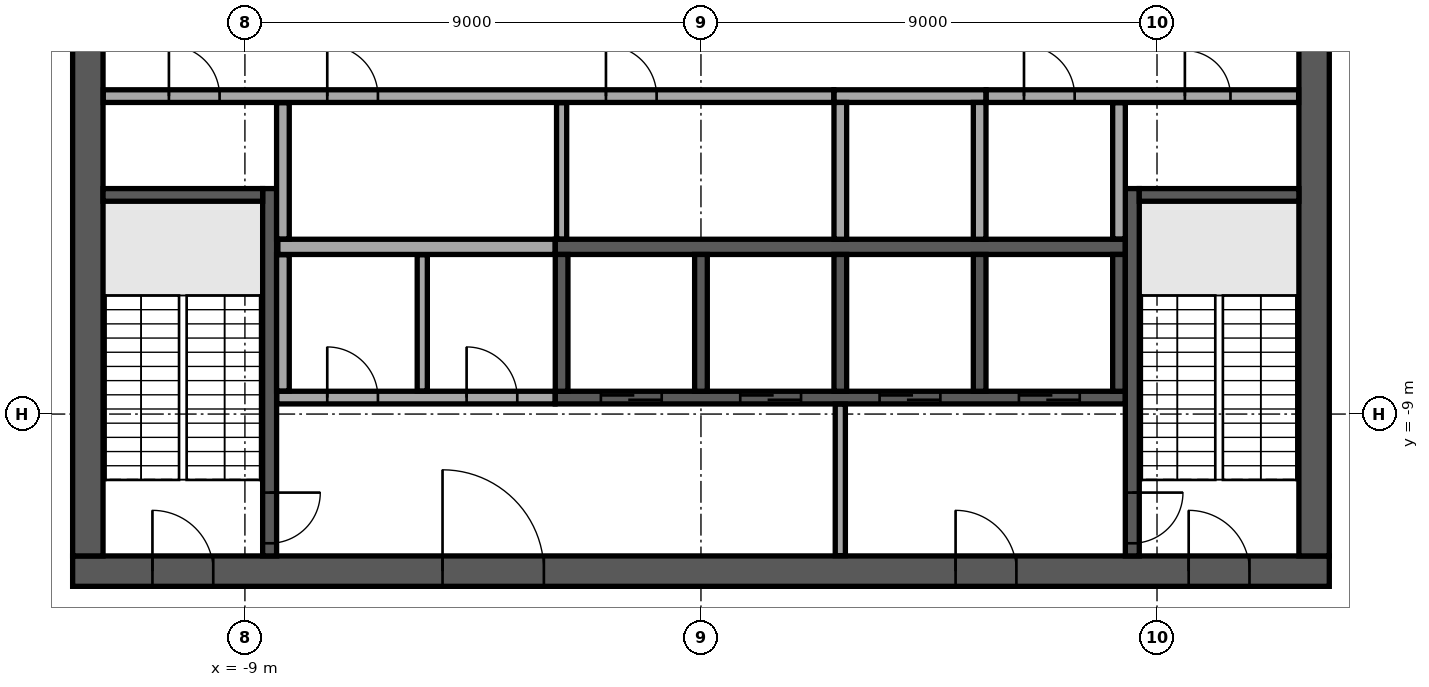
"""IFC4 building model, lengths in metres.
Left out: names, types, materials, properties, quantities, classifications, styles, units other than length and angle.
Written with IfcOpenShell. Run it as: python <this file> out.ifc"""

import sys

from ifc_helpers import new_model, si_unit, direction, frame, frame_2d, origin, place, context, subcontext, project, spatial, rectangle, extrude, element, fill, save


model = new_model("IFC4")
c1 = context("Model", 3, precision=1e-05, world=origin(), true_north=direction((0.0, 1.0)))
c2 = subcontext(c1, "Body", "Model", "MODEL_VIEW")
j1 = project(units=[si_unit("LENGTHUNIT", "METRE"), si_unit("PLANEANGLEUNIT", "RADIAN")], contexts=[c1])
p1 = place(None, origin())
s1 = spatial("IfcSite", under=j1, at=p1, CompositionType="ELEMENT")
p2 = place(p1, origin())
s2 = spatial("IfcBuilding", under=s1, at=p2, CompositionType="ELEMENT")
p3 = place(p2, frame((0.0, 0.0, 358.1)))
s3 = spatial("IfcBuildingStorey", under=s2, at=p3, CompositionType="ELEMENT", Elevation=358.1)
p4 = place(p3, frame((-12.4, -12.1, 0.0), z_axis=(0.0, 0.0, 1.0), x_axis=(1.0, 0.0, 0.0)))
e1 = element("IfcWall", 1, at=p4, inside=s3, PredefinedType="SHEAR", context=c2, shape_type="SweptSolid", body=[
    extrude(rectangle(XDim=24.8, YDim=0.6, at=frame_2d((12.4, 0.0))), origin(), (0.0, 0.0, 1.0), 4.7),
])
p5 = place(p4, frame((7.3, 0.0, 0.0)))
e2 = element("IfcOpeningElement", 2, at=p5, cuts=e1, PredefinedType="OPENING", context=c2, shape_type="SweptSolid", body=[
    extrude(rectangle(XDim=2.0, YDim=2.1, at=frame_2d((1.0, 1.05))), frame((0.0, 0.31, 0.0), z_axis=(0.0, -1.0, 0.0), x_axis=(1.0, 0.0, 0.0)), (0.0, 0.0, 1.0), 0.62),
])
p6 = place(p4, frame((17.425, 0.0, 0.0)))
e3 = element("IfcOpeningElement", 3, at=p6, cuts=e1, PredefinedType="OPENING", context=c2, shape_type="SweptSolid", body=[
    extrude(rectangle(XDim=1.2, YDim=2.1, at=frame_2d((0.6, 1.05))), frame((0.0, 0.31, 0.0), z_axis=(0.0, -1.0, 0.0), x_axis=(1.0, 0.0, 0.0)), (0.0, 0.0, 1.0), 0.62),
])
p7 = place(p4, frame((1.575, 0.0, 0.0)))
e4 = element("IfcOpeningElement", 4, at=p7, cuts=e1, PredefinedType="OPENING", context=c2, shape_type="SweptSolid", body=[
    extrude(rectangle(XDim=1.2, YDim=2.1, at=frame_2d((0.6, 1.05))), frame((0.0, 0.31, 0.0), z_axis=(0.0, -1.0, 0.0), x_axis=(1.0, 0.0, 0.0)), (0.0, 0.0, 1.0), 0.62),
])
p8 = place(p4, frame((22.025, 0.0, 0.0)))
e5 = element("IfcOpeningElement", 5, at=p8, cuts=e1, PredefinedType="OPENING", context=c2, shape_type="SweptSolid", body=[
    extrude(rectangle(XDim=1.2, YDim=2.1, at=frame_2d((0.6, 1.05))), frame((0.0, 0.31, 0.0), z_axis=(0.0, -1.0, 0.0), x_axis=(1.0, 0.0, 0.0)), (0.0, 0.0, 1.0), 0.62),
])
p9 = place(p3, frame((12.1, -11.8, 0.0), z_axis=(0.0, 0.0, 1.0), x_axis=(0.0, 1.0, 0.0)))
e6 = element("IfcWall", 6, at=p9, inside=s3, PredefinedType="SHEAR", context=c2, shape_type="SweptSolid", body=[
    extrude(rectangle(XDim=23.6, YDim=0.6, at=frame_2d((11.8, 0.0))), origin(), (0.0, 0.0, 1.0), 4.7),
])
p10 = place(p9, frame((10.6, 0.0, 0.0)))
e7 = element("IfcOpeningElement", 7, at=p10, cuts=e6, PredefinedType="OPENING", context=c2, shape_type="SweptSolid", body=[
    extrude(rectangle(XDim=2.4, YDim=2.4, at=frame_2d((1.2, 1.2))), frame((0.0, 0.31, 0.0), z_axis=(0.0, -1.0, 0.0), x_axis=(1.0, 0.0, 0.0)), (0.0, 0.0, 1.0), 0.62),
])
p11 = place(p3, frame((-12.1, -11.8, 0.0), z_axis=(0.0, 0.0, 1.0), x_axis=(0.0, 1.0, 0.0)))
e8 = element("IfcWall", 8, at=p11, inside=s3, PredefinedType="SHEAR", context=c2, shape_type="SweptSolid", body=[
    extrude(rectangle(XDim=23.6, YDim=0.6, at=frame_2d((11.8, 0.0))), origin(), (0.0, 0.0, 1.0), 4.7),
])
p12 = place(p11, frame((10.6, 0.0, 0.0)))
e9 = element("IfcOpeningElement", 9, at=p12, cuts=e8, PredefinedType="OPENING", context=c2, shape_type="SweptSolid", body=[
    extrude(rectangle(XDim=2.4, YDim=2.4, at=frame_2d((1.2, 1.2))), frame((0.0, 0.31, 0.0), z_axis=(0.0, -1.0, 0.0), x_axis=(1.0, 0.0, 0.0)), (0.0, 0.0, 1.0), 0.62),
])
p13 = place(p3, frame((-2.875, -5.7, 0.0), z_axis=(0.0, 0.0, 1.0), x_axis=(1.0, 0.0, 0.0)))
e10 = element("IfcWall", 10, at=p13, inside=s3, PredefinedType="SOLIDWALL", context=c2, shape_type="SweptSolid", body=[
    extrude(rectangle(XDim=11.25, YDim=0.3, at=frame_2d((5.625, 0.0))), origin(), (0.0, 0.0, 1.0), 4.7),
])
p14 = place(p3, frame((2.625, -2.725, 0.0), z_axis=(0.0, 0.0, 1.0), x_axis=(1.0, 0.0, 0.0)))
e11 = element("IfcWall", 11, at=p14, inside=s3, PredefinedType="SOLIDWALL", context=c2, shape_type="SweptSolid", body=[
    extrude(rectangle(XDim=3.0, YDim=0.25, at=frame_2d((1.5, 0.0))), origin(), (0.0, 0.0, 1.0), 4.7),
])
for number, where, z_axis, x_axis in (
    (12, (2.75, -5.55, 0.0), (0.0, 0.0, 1.0), (0.0, 1.0, 0.0)),
    (13, (5.5, -5.55, 0.0), (0.0, 0.0, 1.0), (0.0, 1.0, 0.0)),
):
    element("IfcWall", number, at=place(p3, frame(where, z_axis=z_axis, x_axis=x_axis)), inside=s3, PredefinedType="SOLIDWALL", context=c2, shape_type="SweptSolid", body=[
        extrude(rectangle(XDim=2.7, YDim=0.25, at=frame_2d((1.35, 0.0))), origin(), (0.0, 0.0, 1.0), 4.7),
    ])
p15 = place(p3, frame((-2.875, -8.675, 0.0), z_axis=(0.0, 0.0, 1.0), x_axis=(1.0, 0.0, 0.0)))
e14 = element("IfcWall", 14, at=p15, inside=s3, PredefinedType="SOLIDWALL", context=c2, shape_type="SweptSolid", body=[
    extrude(rectangle(XDim=11.25, YDim=0.25, at=frame_2d((5.625, 0.0))), origin(), (0.0, 0.0, 1.0), 4.7),
])
p16 = place(p15, frame((0.9, 0.0, 0.0)))
e15 = element("IfcOpeningElement", 15, at=p16, cuts=e14, PredefinedType="OPENING", context=c2, shape_type="SweptSolid", body=[
    extrude(rectangle(XDim=1.2, YDim=2.1, at=frame_2d((0.6, 1.05))), frame((0.0, 0.135, 0.0), z_axis=(0.0, -1.0, 0.0), x_axis=(1.0, 0.0, 0.0)), (0.0, 0.0, 1.0), 0.27),
])
p17 = place(p15, frame((3.65, 0.0, 0.0)))
e16 = element("IfcOpeningElement", 16, at=p17, cuts=e14, PredefinedType="OPENING", context=c2, shape_type="SweptSolid", body=[
    extrude(rectangle(XDim=1.2, YDim=2.1, at=frame_2d((0.6, 1.05))), frame((0.0, 0.135, 0.0), z_axis=(0.0, -1.0, 0.0), x_axis=(1.0, 0.0, 0.0)), (0.0, 0.0, 1.0), 0.27),
])
p18 = place(p15, frame((6.4, 0.0, 0.0)))
e17 = element("IfcOpeningElement", 17, at=p18, cuts=e14, PredefinedType="OPENING", context=c2, shape_type="SweptSolid", body=[
    extrude(rectangle(XDim=1.2, YDim=2.1, at=frame_2d((0.6, 1.05))), frame((0.0, 0.135, 0.0), z_axis=(0.0, -1.0, 0.0), x_axis=(1.0, 0.0, 0.0)), (0.0, 0.0, 1.0), 0.27),
])
p19 = place(p15, frame((9.15, 0.0, 0.0)))
e18 = element("IfcOpeningElement", 18, at=p19, cuts=e14, PredefinedType="OPENING", context=c2, shape_type="SweptSolid", body=[
    extrude(rectangle(XDim=1.2, YDim=2.1, at=frame_2d((0.6, 1.05))), frame((0.0, 0.135, 0.0), z_axis=(0.0, -1.0, 0.0), x_axis=(1.0, 0.0, 0.0)), (0.0, 0.0, 1.0), 0.27),
])
for number, where, z_axis, x_axis in (
    (19, (-2.75, -8.55, 0.0), (0.0, 0.0, 1.0), (0.0, 1.0, 0.0)),
    (20, (0.0, -8.55, 0.0), (0.0, 0.0, 1.0), (0.0, 1.0, 0.0)),
    (21, (2.75, -8.55, 0.0), (0.0, 0.0, 1.0), (0.0, 1.0, 0.0)),
    (22, (5.5, -8.55, 0.0), (0.0, 0.0, 1.0), (0.0, 1.0, 0.0)),
    (23, (8.25, -8.55, 0.0), (0.0, 0.0, 1.0), (0.0, 1.0, 0.0)),
):
    element("IfcWall", number, at=place(p3, frame(where, z_axis=z_axis, x_axis=x_axis)), inside=s3, PredefinedType="SOLIDWALL", context=c2, shape_type="SweptSolid", body=[
        extrude(rectangle(XDim=2.7, YDim=0.25, at=frame_2d((1.35, 0.0))), origin(), (0.0, 0.0, 1.0), 4.7),
    ])
p20 = place(p3, frame((-8.512, -4.55, 0.0), z_axis=(0.0, 0.0, 1.0), x_axis=(0.0, -1.0, 0.0)))
e24 = element("IfcWall", 24, at=p20, inside=s3, PredefinedType="SOLIDWALL", context=c2, shape_type="SweptSolid", body=[
    extrude(rectangle(XDim=7.25, YDim=0.275, at=frame_2d((3.625, 0.0))), origin(), (0.0, 0.0, 1.0), 4.7),
])
p21 = place(p20, frame((6.0, 0.0, 0.0)))
e25 = element("IfcOpeningElement", 25, at=p21, cuts=e24, PredefinedType="OPENING", context=c2, shape_type="SweptSolid", body=[
    extrude(rectangle(XDim=1.0, YDim=2.1, at=frame_2d((0.5, 1.05))), frame((0.0, 0.147, 0.0), z_axis=(0.0, -1.0, 0.0), x_axis=(1.0, 0.0, 0.0)), (0.0, 0.0, 1.0), 0.295),
])
p22 = place(p3, frame((-8.65, -4.675, 0.0), z_axis=(0.0, 0.0, 1.0), x_axis=(-1.0, 0.0, 0.0)))
e26 = element("IfcWall", 26, at=p22, inside=s3, PredefinedType="SOLIDWALL", context=c2, shape_type="SweptSolid", body=[
    extrude(rectangle(XDim=3.15, YDim=0.25, at=frame_2d((1.575, 0.0))), origin(), (0.0, 0.0, 1.0), 4.7),
])
p23 = place(p3, frame((8.512, -4.55, 0.0), z_axis=(0.0, 0.0, 1.0), x_axis=(0.0, -1.0, 0.0)))
e27 = element("IfcWall", 27, at=p23, inside=s3, PredefinedType="SOLIDWALL", context=c2, shape_type="SweptSolid", body=[
    extrude(rectangle(XDim=7.25, YDim=0.275, at=frame_2d((3.625, 0.0))), origin(), (0.0, 0.0, 1.0), 4.7),
])
p24 = place(p23, frame((6.0, 0.0, 0.0)))
e28 = element("IfcOpeningElement", 28, at=p24, cuts=e27, PredefinedType="OPENING", context=c2, shape_type="SweptSolid", body=[
    extrude(rectangle(XDim=1.0, YDim=2.1, at=frame_2d((0.5, 1.05))), frame((0.0, 0.147, 0.0), z_axis=(0.0, -1.0, 0.0), x_axis=(1.0, 0.0, 0.0)), (0.0, 0.0, 1.0), 0.295),
])
p25 = place(p3, frame((8.65, -4.675, 0.0), z_axis=(0.0, 0.0, 1.0), x_axis=(1.0, 0.0, 0.0)))
e29 = element("IfcWall", 29, at=p25, inside=s3, PredefinedType="SOLIDWALL", context=c2, shape_type="SweptSolid", body=[
    extrude(rectangle(XDim=3.15, YDim=0.25, at=frame_2d((1.575, 0.0))), origin(), (0.0, 0.0, 1.0), 4.7),
])
p26 = place(p3, frame((2.75, -11.795, 0.0), z_axis=(0.0, 0.0, 1.0), x_axis=(0.0, 1.0, 0.0)))
e30 = element("IfcWall", 30, at=p26, inside=s3, PredefinedType="PARTITIONING", context=c2, shape_type="SweptSolid", body=[
    extrude(rectangle(XDim=2.99, YDim=0.2, at=frame_2d((1.495, 0.0))), origin(), (0.0, 0.0, 1.0), 4.7),
])
p27 = place(p3, frame((-8.37, -8.675, 0.0), z_axis=(0.0, 0.0, 1.0), x_axis=(1.0, 0.0, 0.0)))
e31 = element("IfcWall", 31, at=p27, inside=s3, PredefinedType="PARTITIONING", context=c2, shape_type="SweptSolid", body=[
    extrude(rectangle(XDim=5.49, YDim=0.25, at=frame_2d((2.745, 0.0))), origin(), (0.0, 0.0, 1.0), 4.7),
])
p28 = place(p27, frame((0.995, 0.0, 0.0)))
e32 = element("IfcOpeningElement", 32, at=p28, cuts=e31, PredefinedType="OPENING", context=c2, shape_type="SweptSolid", body=[
    extrude(rectangle(XDim=1.0, YDim=2.1, at=frame_2d((0.5, 1.05))), frame((0.0, 0.135, 0.0), z_axis=(0.0, -1.0, 0.0), x_axis=(1.0, 0.0, 0.0)), (0.0, 0.0, 1.0), 0.27),
])
p29 = place(p27, frame((3.745, 0.0, 0.0)))
e33 = element("IfcOpeningElement", 33, at=p29, cuts=e31, PredefinedType="OPENING", context=c2, shape_type="SweptSolid", body=[
    extrude(rectangle(XDim=1.0, YDim=2.1, at=frame_2d((0.5, 1.05))), frame((0.0, 0.135, 0.0), z_axis=(0.0, -1.0, 0.0), x_axis=(1.0, 0.0, 0.0)), (0.0, 0.0, 1.0), 0.27),
])
p30 = place(p3, frame((-8.25, -8.545, 0.0), z_axis=(0.0, 0.0, 1.0), x_axis=(0.0, 1.0, 0.0)))
e34 = element("IfcWall", 34, at=p30, inside=s3, PredefinedType="PARTITIONING", context=c2, shape_type="SweptSolid", body=[
    extrude(rectangle(XDim=2.69, YDim=0.25, at=frame_2d((1.345, 0.0))), origin(), (0.0, 0.0, 1.0), 4.7),
])
p31 = place(p3, frame((-5.5, -8.545, 0.0), z_axis=(0.0, 0.0, 1.0), x_axis=(0.0, 1.0, 0.0)))
e35 = element("IfcWall", 35, at=p31, inside=s3, PredefinedType="PARTITIONING", context=c2, shape_type="SweptSolid", body=[
    extrude(rectangle(XDim=2.69, YDim=0.2, at=frame_2d((1.345, 0.0))), origin(), (0.0, 0.0, 1.0), 4.7),
])
p32 = place(p3, frame((-8.35, -5.7, 0.0), z_axis=(0.0, 0.0, 1.0), x_axis=(1.0, 0.0, 0.0)))
e36 = element("IfcWall", 36, at=p32, inside=s3, PredefinedType="PARTITIONING", context=c2, shape_type="SweptSolid", body=[
    extrude(rectangle(XDim=5.47, YDim=0.3, at=frame_2d((2.735, 0.0))), origin(), (0.0, 0.0, 1.0), 4.7),
])
p33 = place(p3, frame((-8.25, -5.545, 0.0), z_axis=(0.0, 0.0, 1.0), x_axis=(0.0, 1.0, 0.0)))
e37 = element("IfcWall", 37, at=p33, inside=s3, PredefinedType="PARTITIONING", context=c2, shape_type="SweptSolid", body=[
    extrude(rectangle(XDim=2.69, YDim=0.25, at=frame_2d((1.345, 0.0))), origin(), (0.0, 0.0, 1.0), 4.7),
])
p34 = place(p3, frame((-2.75, -5.545, 0.0), z_axis=(0.0, 0.0, 1.0), x_axis=(0.0, 1.0, 0.0)))
e38 = element("IfcWall", 38, at=p34, inside=s3, PredefinedType="PARTITIONING", context=c2, shape_type="SweptSolid", body=[
    extrude(rectangle(XDim=2.69, YDim=0.2, at=frame_2d((1.345, 0.0))), origin(), (0.0, 0.0, 1.0), 4.7),
])
p35 = place(p3, frame((8.25, -5.545, 0.0), z_axis=(0.0, 0.0, 1.0), x_axis=(0.0, 1.0, 0.0)))
e39 = element("IfcWall", 39, at=p35, inside=s3, PredefinedType="PARTITIONING", context=c2, shape_type="SweptSolid", body=[
    extrude(rectangle(XDim=2.69, YDim=0.25, at=frame_2d((1.345, 0.0))), origin(), (0.0, 0.0, 1.0), 4.7),
])
p36 = place(p3, frame((-11.795, -2.725, 0.0), z_axis=(0.0, 0.0, 1.0), x_axis=(1.0, 0.0, 0.0)))
e40 = element("IfcWall", 40, at=p36, inside=s3, PredefinedType="PARTITIONING", context=c2, shape_type="SweptSolid", body=[
    extrude(rectangle(XDim=14.415, YDim=0.25, at=frame_2d((7.208, 0.0))), origin(), (0.0, 0.0, 1.0), 4.7),
])
p37 = place(p36, frame((1.295, 0.0, 0.0)))
e41 = element("IfcOpeningElement", 41, at=p37, cuts=e40, PredefinedType="OPENING", context=c2, shape_type="SweptSolid", body=[
    extrude(rectangle(XDim=1.0, YDim=2.1, at=frame_2d((0.5, 1.05))), frame((0.0, 0.135, 0.0), z_axis=(0.0, -1.0, 0.0), x_axis=(1.0, 0.0, 0.0)), (0.0, 0.0, 1.0), 0.27),
])
p38 = place(p36, frame((4.42, 0.0, 0.0)))
e42 = element("IfcOpeningElement", 42, at=p38, cuts=e40, PredefinedType="OPENING", context=c2, shape_type="SweptSolid", body=[
    extrude(rectangle(XDim=1.0, YDim=2.1, at=frame_2d((0.5, 1.05))), frame((0.0, 0.135, 0.0), z_axis=(0.0, -1.0, 0.0), x_axis=(1.0, 0.0, 0.0)), (0.0, 0.0, 1.0), 0.27),
])
p39 = place(p36, frame((9.92, 0.0, 0.0)))
e43 = element("IfcOpeningElement", 43, at=p39, cuts=e40, PredefinedType="OPENING", context=c2, shape_type="SweptSolid", body=[
    extrude(rectangle(XDim=1.0, YDim=2.1, at=frame_2d((0.5, 1.05))), frame((0.0, 0.135, 0.0), z_axis=(0.0, -1.0, 0.0), x_axis=(1.0, 0.0, 0.0)), (0.0, 0.0, 1.0), 0.27),
])
p40 = place(p3, frame((5.63, -2.725, 0.0), z_axis=(0.0, 0.0, 1.0), x_axis=(1.0, 0.0, 0.0)))
e44 = element("IfcWall", 44, at=p40, inside=s3, PredefinedType="PARTITIONING", context=c2, shape_type="SweptSolid", body=[
    extrude(rectangle(XDim=6.165, YDim=0.25, at=frame_2d((3.083, 0.0))), origin(), (0.0, 0.0, 1.0), 4.7),
])
p41 = place(p40, frame((0.745, 0.0, 0.0)))
e45 = element("IfcOpeningElement", 45, at=p41, cuts=e44, PredefinedType="OPENING", context=c2, shape_type="SweptSolid", body=[
    extrude(rectangle(XDim=1.0, YDim=2.1, at=frame_2d((0.5, 1.05))), frame((0.0, 0.135, 0.0), z_axis=(0.0, -1.0, 0.0), x_axis=(1.0, 0.0, 0.0)), (0.0, 0.0, 1.0), 0.27),
])
p42 = place(p40, frame((3.92, 0.0, 0.0)))
e46 = element("IfcOpeningElement", 46, at=p42, cuts=e44, PredefinedType="OPENING", context=c2, shape_type="SweptSolid", body=[
    extrude(rectangle(XDim=0.9, YDim=2.1, at=frame_2d((0.45, 1.05))), frame((0.0, 0.135, 0.0), z_axis=(0.0, -1.0, 0.0), x_axis=(1.0, 0.0, 0.0)), (0.0, 0.0, 1.0), 0.27),
])
p43 = place(p5, origin())
e47 = element("IfcDoor", 47, at=p43, inside=s3, OperationType="SINGLE_SWING_LEFT", PredefinedType="DOOR", context=c2, shape_type="SweptSolid", body=[
    extrude(rectangle(XDim=2.0, YDim=2.1, at=frame_2d((1.0, 1.05))), frame((0.0, 0.025, 0.0), z_axis=(0.0, -1.0, 0.0), x_axis=(1.0, 0.0, 0.0)), (0.0, 0.0, 1.0), 0.05),
])
fill(e2, e47)
p44 = place(p6, origin())
e48 = element("IfcDoor", 48, at=p44, inside=s3, OperationType="SINGLE_SWING_LEFT", PredefinedType="DOOR", context=c2, shape_type="SweptSolid", body=[
    extrude(rectangle(XDim=1.2, YDim=2.1, at=frame_2d((0.6, 1.05))), frame((0.0, 0.025, 0.0), z_axis=(0.0, -1.0, 0.0), x_axis=(1.0, 0.0, 0.0)), (0.0, 0.0, 1.0), 0.05),
])
fill(e3, e48)
p45 = place(p7, origin())
e49 = element("IfcDoor", 49, at=p45, inside=s3, OperationType="SINGLE_SWING_LEFT", PredefinedType="DOOR", context=c2, shape_type="SweptSolid", body=[
    extrude(rectangle(XDim=1.2, YDim=2.1, at=frame_2d((0.6, 1.05))), frame((0.0, 0.025, 0.0), z_axis=(0.0, -1.0, 0.0), x_axis=(1.0, 0.0, 0.0)), (0.0, 0.0, 1.0), 0.05),
])
fill(e4, e49)
p46 = place(p8, origin())
e50 = element("IfcDoor", 50, at=p46, inside=s3, OperationType="SINGLE_SWING_LEFT", PredefinedType="DOOR", context=c2, shape_type="SweptSolid", body=[
    extrude(rectangle(XDim=1.2, YDim=2.1, at=frame_2d((0.6, 1.05))), frame((0.0, 0.025, 0.0), z_axis=(0.0, -1.0, 0.0), x_axis=(1.0, 0.0, 0.0)), (0.0, 0.0, 1.0), 0.05),
])
fill(e5, e50)
p47 = place(p16, origin())
e51 = element("IfcDoor", 51, at=p47, inside=s3, OperationType="DOUBLE_DOOR_SLIDING", PredefinedType="DOOR", context=c2, shape_type="SweptSolid", body=[
    extrude(rectangle(XDim=1.2, YDim=2.1, at=frame_2d((0.6, 1.05))), frame((0.0, 0.025, 0.0), z_axis=(0.0, -1.0, 0.0), x_axis=(1.0, 0.0, 0.0)), (0.0, 0.0, 1.0), 0.05),
])
fill(e15, e51)
p48 = place(p17, origin())
e52 = element("IfcDoor", 52, at=p48, inside=s3, OperationType="DOUBLE_DOOR_SLIDING", PredefinedType="DOOR", context=c2, shape_type="SweptSolid", body=[
    extrude(rectangle(XDim=1.2, YDim=2.1, at=frame_2d((0.6, 1.05))), frame((0.0, 0.025, 0.0), z_axis=(0.0, -1.0, 0.0), x_axis=(1.0, 0.0, 0.0)), (0.0, 0.0, 1.0), 0.05),
])
fill(e16, e52)
p49 = place(p18, origin())
e53 = element("IfcDoor", 53, at=p49, inside=s3, OperationType="DOUBLE_DOOR_SLIDING", PredefinedType="DOOR", context=c2, shape_type="SweptSolid", body=[
    extrude(rectangle(XDim=1.2, YDim=2.1, at=frame_2d((0.6, 1.05))), frame((0.0, 0.025, 0.0), z_axis=(0.0, -1.0, 0.0), x_axis=(1.0, 0.0, 0.0)), (0.0, 0.0, 1.0), 0.05),
])
fill(e17, e53)
p50 = place(p19, origin())
e54 = element("IfcDoor", 54, at=p50, inside=s3, OperationType="DOUBLE_DOOR_SLIDING", PredefinedType="DOOR", context=c2, shape_type="SweptSolid", body=[
    extrude(rectangle(XDim=1.2, YDim=2.1, at=frame_2d((0.6, 1.05))), frame((0.0, 0.025, 0.0), z_axis=(0.0, -1.0, 0.0), x_axis=(1.0, 0.0, 0.0)), (0.0, 0.0, 1.0), 0.05),
])
fill(e18, e54)
p51 = place(p21, origin())
e55 = element("IfcDoor", 55, at=p51, inside=s3, OperationType="SINGLE_SWING_LEFT", PredefinedType="DOOR", context=c2, shape_type="SweptSolid", body=[
    extrude(rectangle(XDim=1.0, YDim=2.1, at=frame_2d((0.5, 1.05))), frame((0.0, 0.025, 0.0), z_axis=(0.0, -1.0, 0.0), x_axis=(1.0, 0.0, 0.0)), (0.0, 0.0, 1.0), 0.05),
])
fill(e25, e55)
p52 = place(p24, origin())
e56 = element("IfcDoor", 56, at=p52, inside=s3, OperationType="SINGLE_SWING_LEFT", PredefinedType="DOOR", context=c2, shape_type="SweptSolid", body=[
    extrude(rectangle(XDim=1.0, YDim=2.1, at=frame_2d((0.5, 1.05))), frame((0.0, 0.025, 0.0), z_axis=(0.0, -1.0, 0.0), x_axis=(1.0, 0.0, 0.0)), (0.0, 0.0, 1.0), 0.05),
])
fill(e28, e56)
p53 = place(p28, origin())
e57 = element("IfcDoor", 57, at=p53, inside=s3, OperationType="SINGLE_SWING_LEFT", PredefinedType="DOOR", context=c2, shape_type="SweptSolid", body=[
    extrude(rectangle(XDim=1.0, YDim=2.1, at=frame_2d((0.5, 1.05))), frame((0.0, 0.025, 0.0), z_axis=(0.0, -1.0, 0.0), x_axis=(1.0, 0.0, 0.0)), (0.0, 0.0, 1.0), 0.05),
])
fill(e32, e57)
p54 = place(p29, origin())
e58 = element("IfcDoor", 58, at=p54, inside=s3, OperationType="SINGLE_SWING_LEFT", PredefinedType="DOOR", context=c2, shape_type="SweptSolid", body=[
    extrude(rectangle(XDim=1.0, YDim=2.1, at=frame_2d((0.5, 1.05))), frame((0.0, 0.025, 0.0), z_axis=(0.0, -1.0, 0.0), x_axis=(1.0, 0.0, 0.0)), (0.0, 0.0, 1.0), 0.05),
])
fill(e33, e58)
p55 = place(p37, origin())
e59 = element("IfcDoor", 59, at=p55, inside=s3, OperationType="SINGLE_SWING_LEFT", PredefinedType="DOOR", context=c2, shape_type="SweptSolid", body=[
    extrude(rectangle(XDim=1.0, YDim=2.1, at=frame_2d((0.5, 1.05))), frame((0.0, 0.025, 0.0), z_axis=(0.0, -1.0, 0.0), x_axis=(1.0, 0.0, 0.0)), (0.0, 0.0, 1.0), 0.05),
])
fill(e41, e59)
p56 = place(p41, origin())
e60 = element("IfcDoor", 60, at=p56, inside=s3, OperationType="SINGLE_SWING_LEFT", PredefinedType="DOOR", context=c2, shape_type="SweptSolid", body=[
    extrude(rectangle(XDim=1.0, YDim=2.1, at=frame_2d((0.5, 1.05))), frame((0.0, 0.025, 0.0), z_axis=(0.0, -1.0, 0.0), x_axis=(1.0, 0.0, 0.0)), (0.0, 0.0, 1.0), 0.05),
])
fill(e45, e60)
p57 = place(p42, origin())
e61 = element("IfcDoor", 61, at=p57, inside=s3, OperationType="SINGLE_SWING_LEFT", PredefinedType="DOOR", context=c2, shape_type="SweptSolid", body=[
    extrude(rectangle(XDim=0.9, YDim=2.1, at=frame_2d((0.45, 1.05))), frame((0.0, 0.025, 0.0), z_axis=(0.0, -1.0, 0.0), x_axis=(1.0, 0.0, 0.0)), (0.0, 0.0, 1.0), 0.05),
])
fill(e46, e61)
p58 = place(p38, origin())
e62 = element("IfcDoor", 62, at=p58, inside=s3, OperationType="SINGLE_SWING_LEFT", PredefinedType="DOOR", context=c2, shape_type="SweptSolid", body=[
    extrude(rectangle(XDim=1.0, YDim=2.1, at=frame_2d((0.5, 1.05))), frame((0.0, 0.025, 0.0), z_axis=(0.0, -1.0, 0.0), x_axis=(1.0, 0.0, 0.0)), (0.0, 0.0, 1.0), 0.05),
])
fill(e42, e62)
p59 = place(p39, origin())
e63 = element("IfcDoor", 63, at=p59, inside=s3, OperationType="SINGLE_SWING_LEFT", PredefinedType="DOOR", context=c2, shape_type="SweptSolid", body=[
    extrude(rectangle(XDim=1.0, YDim=2.1, at=frame_2d((0.5, 1.05))), frame((0.0, 0.025, 0.0), z_axis=(0.0, -1.0, 0.0), x_axis=(1.0, 0.0, 0.0)), (0.0, 0.0, 1.0), 0.05),
])
fill(e43, e63)
save(model, sys.argv[1])
